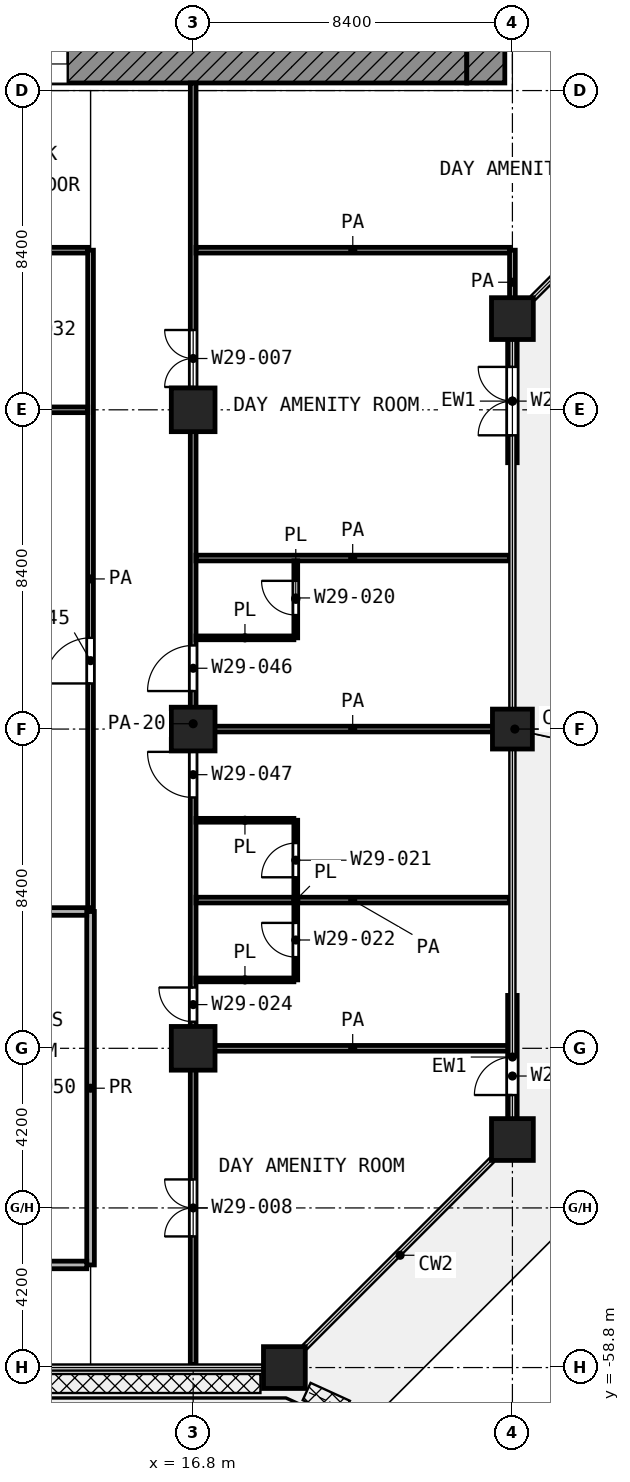
"""IFC4 building model, lengths in metres.
Left out: names, types, materials, properties, quantities, classifications, styles, units other than length and angle.
Written with IfcOpenShell. Run it as: python <this file> out.ifc"""

import sys

from ifc_helpers import new_model, si_unit, direction, frame, frame_2d, origin, origin_2d, place, context, subcontext, project, spatial, rectangle, extrude, element, fill, save


model = new_model("IFC4")
c1 = context("Model", 3, precision=1e-05, world=origin(), true_north=direction((0.0, 1.0)))
c2 = subcontext(c1, "Body", "Model", "MODEL_VIEW")
j1 = project(units=[si_unit("LENGTHUNIT", "METRE"), si_unit("PLANEANGLEUNIT", "RADIAN")], contexts=[c1])
p1 = place(None, origin())
s1 = spatial("IfcSite", under=j1, at=p1, CompositionType="ELEMENT")
p2 = place(p1, origin())
s2 = spatial("IfcBuilding", under=s1, at=p2, CompositionType="ELEMENT")
p3 = place(p2, frame((0.0, 0.0, 128.2)))
s3 = spatial("IfcBuildingStorey", under=s2, at=p3, CompositionType="ELEMENT", Elevation=128.2)
p4 = place(p3, frame((25.2, -31.2, 0.0), z_axis=(0.0, 0.0, 1.0), x_axis=(1.0, 0.0, 0.0)))
e1 = element("IfcColumn", 1, at=p4, inside=s3, PredefinedType="COLUMN", context=c2, shape_type="SweptSolid", body=[
    extrude(rectangle(XDim=1.1, YDim=1.1, at=origin_2d()), origin(), (0.0, 0.0, 1.0), 4.2),
])
for number, where, z_axis, x_axis in (
    (2, (16.8, -33.6, 0.0), (0.0, 0.0, 1.0), (1.0, 0.0, 0.0)),
    (3, (16.8, -42.0, 0.0), (0.0, 0.0, 1.0), (1.0, 0.0, 0.0)),
):
    element("IfcColumn", number, at=place(p3, frame(where, z_axis=z_axis, x_axis=x_axis)), inside=s3, PredefinedType="COLUMN", context=c2, shape_type="SweptSolid", body=[
        extrude(rectangle(XDim=1.15, YDim=1.15, at=origin_2d()), origin(), (0.0, 0.0, 1.0), 4.2),
    ])
p5 = place(p3, frame((25.2, -42.0, 0.0), z_axis=(0.0, 0.0, 1.0), x_axis=(1.0, 0.0, 0.0)))
e4 = element("IfcColumn", 4, at=p5, inside=s3, PredefinedType="COLUMN", context=c2, shape_type="SweptSolid", body=[
    extrude(rectangle(XDim=1.05, YDim=1.05, at=origin_2d()), origin(), (0.0, 0.0, 1.0), 4.2),
])
p6 = place(p3, frame((16.8, -50.4, 0.0), z_axis=(0.0, 0.0, 1.0), x_axis=(1.0, 0.0, 0.0)))
e5 = element("IfcColumn", 5, at=p6, inside=s3, PredefinedType="COLUMN", context=c2, shape_type="SweptSolid", body=[
    extrude(rectangle(XDim=1.15, YDim=1.15, at=origin_2d()), origin(), (0.0, 0.0, 1.0), 4.2),
])
for number, where, z_axis, x_axis in (
    (6, (25.2, -52.8, 0.0), (0.0, 0.0, 1.0), (1.0, 0.0, 0.0)),
    (7, (19.2, -58.8, 0.0), (0.0, 0.0, 1.0), (1.0, 0.0, 0.0)),
):
    element("IfcColumn", number, at=place(p3, frame(where, z_axis=z_axis, x_axis=x_axis)), inside=s3, PredefinedType="COLUMN", context=c2, shape_type="SweptSolid", body=[
        extrude(rectangle(XDim=1.1, YDim=1.1, at=origin_2d()), origin(), (0.0, 0.0, 1.0), 4.2),
    ])
p7 = place(p3, frame((25.2, -52.25, 0.0), z_axis=(0.0, 0.0, 1.0), x_axis=(0.0, 1.0, 0.0)))
e8 = element("IfcWall", 8, at=p7, inside=s3, PredefinedType="SOLIDWALL", context=c2, shape_type="SweptSolid", body=[
    extrude(rectangle(XDim=3.242, YDim=0.25, at=frame_2d((1.621, 0.0))), origin(), (0.0, 0.0, 1.0), 3.48),
])
p8 = place(p7, frame((0.621, 0.0, 0.0)))
e9 = element("IfcOpeningElement", 9, at=p8, cuts=e8, PredefinedType="OPENING", context=c2, shape_type="SweptSolid", body=[
    extrude(rectangle(XDim=1.0, YDim=2.1, at=frame_2d((0.5, 1.05))), frame((0.0, 0.135, 0.0), z_axis=(0.0, -1.0, 0.0), x_axis=(1.0, 0.0, 0.0)), (0.0, 0.0, 1.0), 0.27),
])
p9 = place(p3, frame((25.2, -34.992, 0.0), z_axis=(0.0, 0.0, 1.0), x_axis=(0.0, 1.0, 0.0)))
e10 = element("IfcWall", 10, at=p9, inside=s3, PredefinedType="SOLIDWALL", context=c2, shape_type="SweptSolid", body=[
    extrude(rectangle(XDim=3.242, YDim=0.25, at=frame_2d((1.621, 0.0))), origin(), (0.0, 0.0, 1.0), 3.48),
])
p10 = place(p9, frame((0.721, 0.0, 0.0)))
e11 = element("IfcOpeningElement", 11, at=p10, cuts=e10, PredefinedType="OPENING", context=c2, shape_type="SweptSolid", body=[
    extrude(rectangle(XDim=1.8, YDim=2.1, at=frame_2d((0.9, 1.05))), frame((0.0, 0.135, 0.0), z_axis=(0.0, -1.0, 0.0), x_axis=(1.0, 0.0, 0.0)), (0.0, 0.0, 1.0), 0.27),
])
p11 = place(p3, frame((5.4, -24.5, 0.0), z_axis=(0.0, 0.0, 1.0), x_axis=(1.0, 0.0, 0.0)))
e12 = element("IfcWall", 12, at=p11, inside=s3, PredefinedType="SHEAR", context=c2, shape_type="SweptSolid", body=[
    extrude(rectangle(XDim=18.6, YDim=1.0, at=frame_2d((9.3, 0.0))), origin(), (0.0, 0.0, 1.0), 3.6),
])
p12 = place(p11, frame((6.3, 0.0, 0.0)))
e13 = element("IfcOpeningElement", 13, at=p12, cuts=e12, PredefinedType="OPENING", context=c2, shape_type="SweptSolid", body=[
    extrude(rectangle(XDim=1.8, YDim=2.1, at=frame_2d((0.9, 1.05))), frame((0.0, 0.51, 0.0), z_axis=(0.0, -1.0, 0.0), x_axis=(1.0, 0.0, 0.0)), (0.0, 0.0, 1.0), 1.02),
])
p13 = place(p3, frame((24.5, -25.0, 0.0), z_axis=(0.0, 0.0, 1.0), x_axis=(0.0, 1.0, 0.0)))
e14 = element("IfcWall", 14, at=p13, inside=s3, PredefinedType="SHEAR", context=c2, shape_type="SweptSolid", body=[
    extrude(rectangle(XDim=1.0, YDim=1.0, at=frame_2d((0.5, 0.0))), origin(), (0.0, 0.0, 1.0), 3.6),
])
for number, where, z_axis, x_axis in (
    (15, (16.875, -48.6, 0.0), (0.0, 0.0, 1.0), (1.0, 0.0, 0.0)),
    (16, (16.875, -44.4, 0.0), (0.0, 0.0, 1.0), (1.0, 0.0, 0.0)),
    (17, (16.875, -39.6, 0.0), (0.0, 0.0, 1.0), (1.0, 0.0, 0.0)),
):
    element("IfcWall", number, at=place(p3, frame(where, z_axis=z_axis, x_axis=x_axis)), inside=s3, PredefinedType="PARTITIONING", context=c2, shape_type="SweptSolid", body=[
        extrude(rectangle(XDim=2.575, YDim=0.1, at=frame_2d((1.288, 0.0))), origin(), (0.0, 0.0, 1.0), 3.6),
    ])
p14 = place(p3, frame((19.5, -48.6, 0.0), z_axis=(0.0, 0.0, 1.0), x_axis=(0.0, 1.0, 0.0)))
e18 = element("IfcWall", 18, at=p14, inside=s3, PredefinedType="PARTITIONING", context=c2, shape_type="SweptSolid", body=[
    extrude(rectangle(XDim=4.2, YDim=0.1, at=frame_2d((2.1, 0.0))), origin(), (0.0, 0.0, 1.0), 3.6),
])
p15 = place(p14, frame((2.7, 0.0, 0.0)))
e19 = element("IfcOpeningElement", 19, at=p15, cuts=e18, PredefinedType="OPENING", context=c2, shape_type="SweptSolid", body=[
    extrude(rectangle(XDim=0.9, YDim=2.1, at=frame_2d((0.45, 1.05))), frame((0.0, 0.06, 0.0), z_axis=(0.0, -1.0, 0.0), x_axis=(1.0, 0.0, 0.0)), (0.0, 0.0, 1.0), 0.12),
])
p16 = place(p14, frame((0.6, 0.0, 0.0)))
e20 = element("IfcOpeningElement", 20, at=p16, cuts=e18, PredefinedType="OPENING", context=c2, shape_type="SweptSolid", body=[
    extrude(rectangle(XDim=0.9, YDim=2.1, at=frame_2d((0.45, 1.05))), frame((0.0, 0.06, 0.0), z_axis=(0.0, -1.0, 0.0), x_axis=(1.0, 0.0, 0.0)), (0.0, 0.0, 1.0), 0.12),
])
p17 = place(p3, frame((19.5, -39.6, 0.0), z_axis=(0.0, 0.0, 1.0), x_axis=(0.0, 1.0, 0.0)))
e21 = element("IfcWall", 21, at=p17, inside=s3, PredefinedType="PARTITIONING", context=c2, shape_type="SweptSolid", body=[
    extrude(rectangle(XDim=2.025, YDim=0.1, at=frame_2d((1.013, 0.0))), origin(), (0.0, 0.0, 1.0), 3.6),
])
p18 = place(p17, frame((0.6, 0.0, 0.0)))
e22 = element("IfcOpeningElement", 22, at=p18, cuts=e21, PredefinedType="OPENING", context=c2, shape_type="SweptSolid", body=[
    extrude(rectangle(XDim=0.9, YDim=2.1, at=frame_2d((0.45, 1.05))), frame((0.0, 0.06, 0.0), z_axis=(0.0, -1.0, 0.0), x_axis=(1.0, 0.0, 0.0)), (0.0, 0.0, 1.0), 0.12),
])
for number, where, z_axis, x_axis in (
    (23, (16.875, -50.4, 0.0), (0.0, 0.0, 1.0), (1.0, 0.0, 0.0)),
    (24, (16.875, -46.5, 0.0), (0.0, 0.0, 1.0), (1.0, 0.0, 0.0)),
    (25, (16.875, -42.0, 0.0), (0.0, 0.0, 1.0), (1.0, 0.0, 0.0)),
    (26, (16.875, -37.5, 0.0), (0.0, 0.0, 1.0), (1.0, 0.0, 0.0)),
):
    element("IfcWall", number, at=place(p3, frame(where, z_axis=z_axis, x_axis=x_axis)), inside=s3, PredefinedType="PARTITIONING", context=c2, shape_type="SweptSolid", body=[
        extrude(rectangle(XDim=8.245, YDim=0.15, at=frame_2d((4.123, 0.0))), origin(), (0.0, 0.0, 1.0), 3.6),
    ])
for number, where, z_axis, x_axis in (
    (27, (11.175, -33.6, 0.0), (0.0, 0.0, 1.0), (1.0, 0.0, 0.0)),
    (28, (11.175, -29.4, 0.0), (0.0, 0.0, 1.0), (1.0, 0.0, 0.0)),
):
    element("IfcWall", number, at=place(p3, frame(where, z_axis=z_axis, x_axis=x_axis)), inside=s3, PredefinedType="PARTITIONING", context=c2, shape_type="SweptSolid", body=[
        extrude(rectangle(XDim=2.85, YDim=0.15, at=frame_2d((1.425, 0.0))), origin(), (0.0, 0.0, 1.0), 3.6),
    ])
p19 = place(p3, frame((16.875, -29.4, 0.0), z_axis=(0.0, 0.0, 1.0), x_axis=(1.0, 0.0, 0.0)))
e29 = element("IfcWall", 29, at=p19, inside=s3, PredefinedType="PARTITIONING", context=c2, shape_type="SweptSolid", body=[
    extrude(rectangle(XDim=8.25, YDim=0.15, at=frame_2d((4.125, 0.0))), origin(), (0.0, 0.0, 1.0), 3.6),
])
p20 = place(p3, frame((14.1, -46.7, 0.0), z_axis=(0.0, 0.0, 1.0), x_axis=(0.0, 1.0, 0.0)))
e30 = element("IfcWall", 30, at=p20, inside=s3, PredefinedType="PARTITIONING", context=c2, shape_type="SweptSolid", body=[
    extrude(rectangle(XDim=17.3, YDim=0.15, at=frame_2d((8.65, 0.0))), origin(), (0.0, 0.0, 1.0), 3.6),
])
p21 = place(p20, frame((5.9, 0.0, 0.0)))
e31 = element("IfcOpeningElement", 31, at=p21, cuts=e30, PredefinedType="OPENING", context=c2, shape_type="SweptSolid", body=[
    extrude(rectangle(XDim=1.2, YDim=2.1, at=frame_2d((0.6, 1.05))), frame((0.0, 0.085, 0.0), z_axis=(0.0, -1.0, 0.0), x_axis=(1.0, 0.0, 0.0)), (0.0, 0.0, 1.0), 0.17),
])
p22 = place(p3, frame((16.8, -58.72, 0.0), z_axis=(0.0, 0.0, 1.0), x_axis=(0.0, 1.0, 0.0)))
e32 = element("IfcWall", 32, at=p22, inside=s3, PredefinedType="PARTITIONING", context=c2, shape_type="SweptSolid", body=[
    extrude(rectangle(XDim=33.72, YDim=0.15, at=frame_2d((16.86, 0.0))), origin(), (0.0, 0.0, 1.0), 2.7),
])
p23 = place(p22, frame((25.72, 0.0, 0.0)))
e33 = element("IfcOpeningElement", 33, at=p23, cuts=e32, PredefinedType="OPENING", context=c2, shape_type="SweptSolid", body=[
    extrude(rectangle(XDim=1.5, YDim=2.1, at=frame_2d((0.75, 1.05))), frame((0.0, 0.085, 0.0), z_axis=(0.0, -1.0, 0.0), x_axis=(1.0, 0.0, 0.0)), (0.0, 0.0, 1.0), 0.17),
])
p24 = place(p22, frame((17.72, 0.0, 0.0)))
e34 = element("IfcOpeningElement", 34, at=p24, cuts=e32, PredefinedType="OPENING", context=c2, shape_type="SweptSolid", body=[
    extrude(rectangle(XDim=1.2, YDim=2.1, at=frame_2d((0.6, 1.05))), frame((0.0, 0.085, 0.0), z_axis=(0.0, -1.0, 0.0), x_axis=(1.0, 0.0, 0.0)), (0.0, 0.0, 1.0), 0.17),
])
p25 = place(p22, frame((14.92, 0.0, 0.0)))
e35 = element("IfcOpeningElement", 35, at=p25, cuts=e32, PredefinedType="OPENING", context=c2, shape_type="SweptSolid", body=[
    extrude(rectangle(XDim=1.2, YDim=2.1, at=frame_2d((0.6, 1.05))), frame((0.0, 0.085, 0.0), z_axis=(0.0, -1.0, 0.0), x_axis=(1.0, 0.0, 0.0)), (0.0, 0.0, 1.0), 0.17),
])
p26 = place(p22, frame((9.02, 0.0, 0.0)))
e36 = element("IfcOpeningElement", 36, at=p26, cuts=e32, PredefinedType="OPENING", context=c2, shape_type="SweptSolid", body=[
    extrude(rectangle(XDim=0.9, YDim=2.1, at=frame_2d((0.45, 1.05))), frame((0.0, 0.085, 0.0), z_axis=(0.0, -1.0, 0.0), x_axis=(1.0, 0.0, 0.0)), (0.0, 0.0, 1.0), 0.17),
])
p27 = place(p22, frame((3.37, 0.0, 0.0)))
e37 = element("IfcOpeningElement", 37, at=p27, cuts=e32, PredefinedType="OPENING", context=c2, shape_type="SweptSolid", body=[
    extrude(rectangle(XDim=1.5, YDim=2.1, at=frame_2d((0.75, 1.05))), frame((0.0, 0.085, 0.0), z_axis=(0.0, -1.0, 0.0), x_axis=(1.0, 0.0, 0.0)), (0.0, 0.0, 1.0), 0.17),
])
p28 = place(p3, frame((25.2, -31.087, 0.0), z_axis=(0.0, 0.0, 1.0), x_axis=(0.0, 1.0, 0.0)))
e38 = element("IfcWall", 38, at=p28, inside=s3, PredefinedType="PARTITIONING", context=c2, shape_type="SweptSolid", body=[
    extrude(rectangle(XDim=1.687, YDim=0.15, at=frame_2d((0.844, 0.0))), origin(), (0.0, 0.0, 1.0), 3.6),
])
for number, where, z_axis, x_axis in (
    (39, (11.2, -56.1, 0.0), (0.0, 0.0, 1.0), (1.0, 0.0, 0.0)),
    (40, (11.2, -46.8, 0.0), (0.0, 0.0, 1.0), (1.0, 0.0, 0.0)),
):
    element("IfcWall", number, at=place(p3, frame(where, z_axis=z_axis, x_axis=x_axis)), inside=s3, PredefinedType="PARTITIONING", context=c2, shape_type="SweptSolid", body=[
        extrude(rectangle(XDim=2.8, YDim=0.2, at=frame_2d((1.4, 0.0))), origin(), (0.0, 0.0, 1.0), 3.6),
    ])
p29 = place(p3, frame((14.1, -56.1, 0.0), z_axis=(0.0, 0.0, 1.0), x_axis=(0.0, 1.0, 0.0)))
e41 = element("IfcWall", 41, at=p29, inside=s3, PredefinedType="PARTITIONING", context=c2, shape_type="SweptSolid", body=[
    extrude(rectangle(XDim=9.3, YDim=0.2, at=frame_2d((4.65, 0.0))), origin(), (0.0, 0.0, 1.0), 3.6),
])
p30 = place(p8, origin())
e42 = element("IfcDoor", 42, at=p30, inside=s3, OperationType="SINGLE_SWING_LEFT", PredefinedType="DOOR", context=c2, shape_type="SweptSolid", body=[
    extrude(rectangle(XDim=1.0, YDim=2.1, at=frame_2d((0.5, 1.05))), frame((0.0, 0.025, 0.0), z_axis=(0.0, -1.0, 0.0), x_axis=(1.0, 0.0, 0.0)), (0.0, 0.0, 1.0), 0.05),
])
fill(e9, e42)
p31 = place(p10, origin())
e43 = element("IfcDoor", 43, at=p31, inside=s3, OperationType="DOUBLE_DOOR_SINGLE_SWING", PredefinedType="DOOR", context=c2, shape_type="SweptSolid", body=[
    extrude(rectangle(XDim=1.8, YDim=2.1, at=frame_2d((0.9, 1.05))), frame((0.0, 0.025, 0.0), z_axis=(0.0, -1.0, 0.0), x_axis=(1.0, 0.0, 0.0)), (0.0, 0.0, 1.0), 0.05),
])
fill(e11, e43)
p32 = place(p12, origin())
e44 = element("IfcDoor", 44, at=p32, inside=s3, OperationType="DOUBLE_DOOR_SINGLE_SWING", PredefinedType="DOOR", context=c2, shape_type="SweptSolid", body=[
    extrude(rectangle(XDim=1.8, YDim=2.1, at=frame_2d((0.9, 1.05))), frame((0.0, 0.025, 0.0), z_axis=(0.0, -1.0, 0.0), x_axis=(1.0, 0.0, 0.0)), (0.0, 0.0, 1.0), 0.05),
])
fill(e13, e44)
p33 = place(p21, origin())
e45 = element("IfcDoor", 45, at=p33, inside=s3, OperationType="SINGLE_SWING_LEFT", PredefinedType="DOOR", context=c2, shape_type="SweptSolid", body=[
    extrude(rectangle(XDim=1.2, YDim=2.1, at=frame_2d((0.6, 1.05))), frame((0.0, 0.025, 0.0), z_axis=(0.0, -1.0, 0.0), x_axis=(1.0, 0.0, 0.0)), (0.0, 0.0, 1.0), 0.05),
])
fill(e31, e45)
p34 = place(p23, origin())
e46 = element("IfcDoor", 46, at=p34, inside=s3, OperationType="DOUBLE_DOOR_SINGLE_SWING", PredefinedType="DOOR", context=c2, shape_type="SweptSolid", body=[
    extrude(rectangle(XDim=1.5, YDim=2.1, at=frame_2d((0.75, 1.05))), frame((0.0, 0.025, 0.0), z_axis=(0.0, -1.0, 0.0), x_axis=(1.0, 0.0, 0.0)), (0.0, 0.0, 1.0), 0.05),
])
fill(e33, e46)
p35 = place(p24, origin())
e47 = element("IfcDoor", 47, at=p35, inside=s3, OperationType="SINGLE_SWING_LEFT", PredefinedType="DOOR", context=c2, shape_type="SweptSolid", body=[
    extrude(rectangle(XDim=1.2, YDim=2.1, at=frame_2d((0.6, 1.05))), frame((0.0, 0.025, 0.0), z_axis=(0.0, -1.0, 0.0), x_axis=(1.0, 0.0, 0.0)), (0.0, 0.0, 1.0), 0.05),
])
fill(e34, e47)
p36 = place(p18, origin())
e48 = element("IfcDoor", 48, at=p36, inside=s3, OperationType="SINGLE_SWING_RIGHT", PredefinedType="DOOR", context=c2, shape_type="SweptSolid", body=[
    extrude(rectangle(XDim=0.9, YDim=2.1, at=frame_2d((0.45, 1.05))), frame((0.0, 0.025, 0.0), z_axis=(0.0, -1.0, 0.0), x_axis=(1.0, 0.0, 0.0)), (0.0, 0.0, 1.0), 0.05),
])
fill(e22, e48)
p37 = place(p25, origin())
e49 = element("IfcDoor", 49, at=p37, inside=s3, OperationType="SINGLE_SWING_RIGHT", PredefinedType="DOOR", context=c2, shape_type="SweptSolid", body=[
    extrude(rectangle(XDim=1.2, YDim=2.1, at=frame_2d((0.6, 1.05))), frame((0.0, 0.025, 0.0), z_axis=(0.0, -1.0, 0.0), x_axis=(1.0, 0.0, 0.0)), (0.0, 0.0, 1.0), 0.05),
])
fill(e35, e49)
p38 = place(p15, origin())
e50 = element("IfcDoor", 50, at=p38, inside=s3, OperationType="SINGLE_SWING_LEFT", PredefinedType="DOOR", context=c2, shape_type="SweptSolid", body=[
    extrude(rectangle(XDim=0.9, YDim=2.1, at=frame_2d((0.45, 1.05))), frame((0.0, 0.025, 0.0), z_axis=(0.0, -1.0, 0.0), x_axis=(1.0, 0.0, 0.0)), (0.0, 0.0, 1.0), 0.05),
])
fill(e19, e50)
p39 = place(p26, origin())
e51 = element("IfcDoor", 51, at=p39, inside=s3, OperationType="SINGLE_SWING_RIGHT", PredefinedType="DOOR", context=c2, shape_type="SweptSolid", body=[
    extrude(rectangle(XDim=0.9, YDim=2.1, at=frame_2d((0.45, 1.05))), frame((0.0, 0.025, 0.0), z_axis=(0.0, -1.0, 0.0), x_axis=(1.0, 0.0, 0.0)), (0.0, 0.0, 1.0), 0.05),
])
fill(e36, e51)
p40 = place(p16, origin())
e52 = element("IfcDoor", 52, at=p40, inside=s3, OperationType="SINGLE_SWING_RIGHT", PredefinedType="DOOR", context=c2, shape_type="SweptSolid", body=[
    extrude(rectangle(XDim=0.9, YDim=2.1, at=frame_2d((0.45, 1.05))), frame((0.0, 0.025, 0.0), z_axis=(0.0, -1.0, 0.0), x_axis=(1.0, 0.0, 0.0)), (0.0, 0.0, 1.0), 0.05),
])
fill(e20, e52)
p41 = place(p27, origin())
e53 = element("IfcDoor", 53, at=p41, inside=s3, OperationType="DOUBLE_DOOR_SINGLE_SWING", PredefinedType="DOOR", context=c2, shape_type="SweptSolid", body=[
    extrude(rectangle(XDim=1.5, YDim=2.1, at=frame_2d((0.75, 1.05))), frame((0.0, 0.025, 0.0), z_axis=(0.0, -1.0, 0.0), x_axis=(1.0, 0.0, 0.0)), (0.0, 0.0, 1.0), 0.05),
])
fill(e37, e53)
save(model, sys.argv[1])
